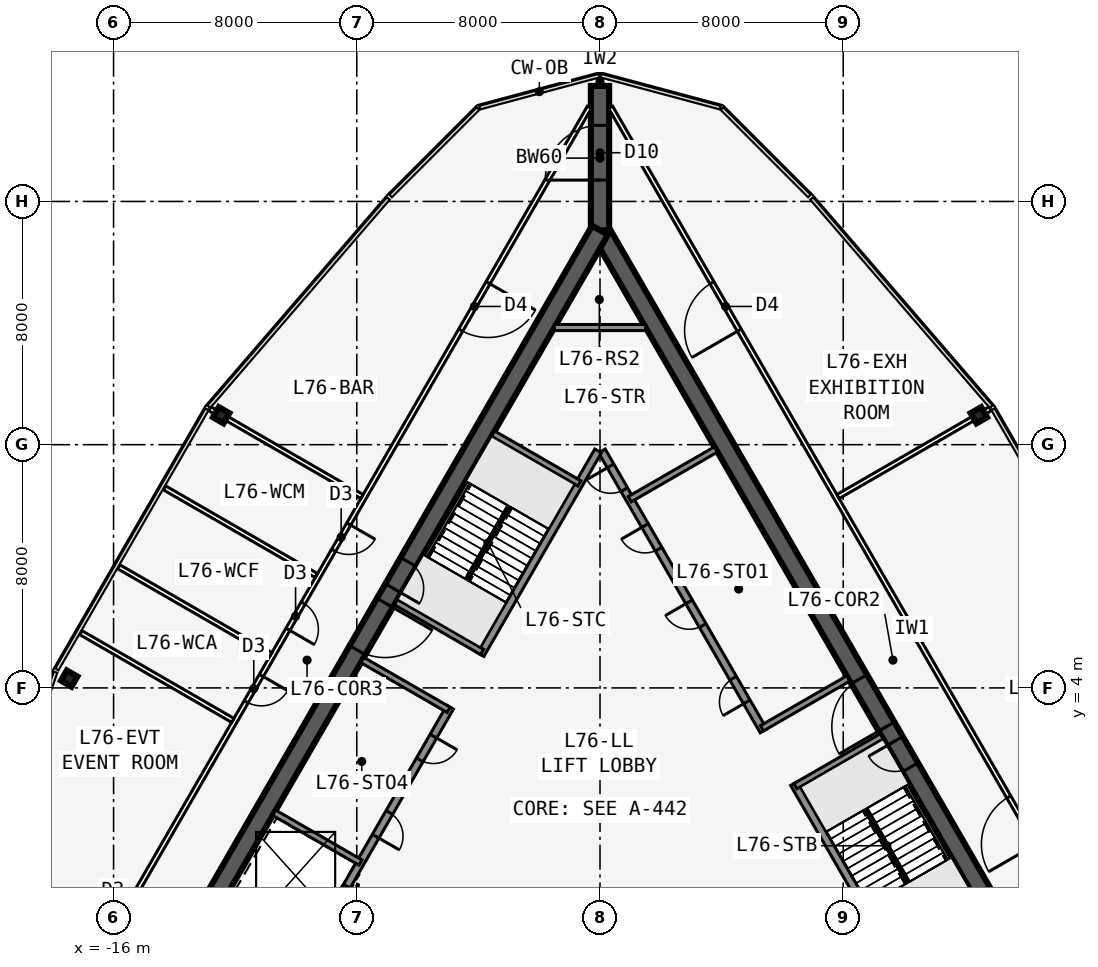
"""IFC4 building model, lengths in metres.
Left out: names, types, materials, properties, quantities, classifications, styles, units other than length and angle.
Written with IfcOpenShell. Run it as: python <this file> out.ifc"""

import sys

from ifc_helpers import new_model, si_unit, direction, frame, frame_2d, origin, origin_2d, place, context, subcontext, project, spatial, rectangle, i_section, extrude, element, fill, save


model = new_model("IFC4")
c1 = context("Model", 3, precision=1e-05, world=origin(), true_north=direction((0.0, 1.0)))
c2 = subcontext(c1, "Body", "Model", "MODEL_VIEW")
j1 = project(units=[si_unit("LENGTHUNIT", "METRE"), si_unit("PLANEANGLEUNIT", "RADIAN")], contexts=[c1])
p1 = place(None, origin())
s1 = spatial("IfcSite", under=j1, at=p1, CompositionType="ELEMENT")
p2 = place(p1, origin())
s2 = spatial("IfcBuilding", under=s1, at=p2, CompositionType="ELEMENT")
p3 = place(p2, frame((0.0, 0.0, 292.8)))
s3 = spatial("IfcBuildingStorey", under=s2, at=p3, CompositionType="ELEMENT", Elevation=292.8)
p4 = place(p3, frame((16.5, -9.526, 0.0), z_axis=(0.0, 0.0, 1.0), x_axis=(-0.499999749417, 0.866025548458, 0.0)))
e1 = element("IfcWall", 1, at=p4, inside=s3, PredefinedType="SHEAR", context=c2, shape_type="SweptSolid", body=[
    extrude(rectangle(XDim=33.0, YDim=0.6, at=frame_2d((16.5, 0.0))), origin(), (0.0, 0.0, 1.0), 5.0),
])
p5 = place(p4, frame((14.15, 0.0, 0.0)))
e2 = element("IfcOpeningElement", 2, at=p5, cuts=e1, PredefinedType="OPENING", context=c2, shape_type="SweptSolid", body=[
    extrude(rectangle(XDim=1.8, YDim=2.13, at=frame_2d((0.9, 1.065))), frame((0.0, 0.31, 0.0), z_axis=(0.0, -1.0, 0.0), x_axis=(1.0, 0.0, 0.0)), (0.0, 0.0, 1.0), 0.62),
])
p6 = place(p4, frame((12.6, 0.0, 0.0)))
e3 = element("IfcOpeningElement", 3, at=p6, cuts=e1, PredefinedType="OPENING", context=c2, shape_type="SweptSolid", body=[
    extrude(rectangle(XDim=1.0, YDim=2.13, at=frame_2d((0.5, 1.065))), frame((0.0, 0.31, 0.0), z_axis=(0.0, -1.0, 0.0), x_axis=(1.0, 0.0, 0.0)), (0.0, 0.0, 1.0), 0.62),
])
p7 = place(p3, frame((10.245, -5.843, 0.0), z_axis=(0.0, 0.0, 1.0), x_axis=(-0.499993009313, 0.866029439822, 0.0)))
e4 = element("IfcWall", 4, at=p7, inside=s3, PredefinedType="SOLIDWALL", context=c2, shape_type="SweptSolid", body=[
    extrude(rectangle(XDim=7.733, YDim=0.25, at=frame_2d((3.866, 0.0))), origin(), (0.0, 0.0, 1.0), 4.75),
])
p8 = place(p3, frame((5.379, 2.586, 0.0), z_axis=(0.0, 0.0, 1.0), x_axis=(-0.500001375892, 0.866024609411, 0.0)))
e5 = element("IfcWall", 5, at=p8, inside=s3, PredefinedType="SOLIDWALL", context=c2, shape_type="SweptSolid", body=[
    extrude(rectangle(XDim=10.633, YDim=0.25, at=frame_2d((5.316, 0.0))), origin(), (0.0, 0.0, 1.0), 4.75),
])
p9 = place(p8, frame((9.164, 0.0, 0.0)))
e6 = element("IfcOpeningElement", 6, at=p9, cuts=e5, PredefinedType="OPENING", context=c2, shape_type="SweptSolid", body=[
    extrude(rectangle(XDim=0.9, YDim=2.13, at=frame_2d((0.45, 1.065))), frame((0.0, 0.135, 0.0), z_axis=(0.0, -1.0, 0.0), x_axis=(1.0, 0.0, 0.0)), (0.0, 0.0, 1.0), 0.27),
])
p10 = place(p8, frame((1.1, 0.0, 0.0)))
e7 = element("IfcOpeningElement", 7, at=p10, cuts=e5, PredefinedType="OPENING", context=c2, shape_type="SweptSolid", body=[
    extrude(rectangle(XDim=0.9, YDim=2.13, at=frame_2d((0.45, 1.065))), frame((0.0, 0.135, 0.0), z_axis=(0.0, -1.0, 0.0), x_axis=(1.0, 0.0, 0.0)), (0.0, 0.0, 1.0), 0.27),
])
p11 = place(p8, frame((4.0, 0.0, 0.0)))
e8 = element("IfcOpeningElement", 8, at=p11, cuts=e5, PredefinedType="OPENING", context=c2, shape_type="SweptSolid", body=[
    extrude(rectangle(XDim=0.9, YDim=2.13, at=frame_2d((0.45, 1.065))), frame((0.0, 0.135, 0.0), z_axis=(0.0, -1.0, 0.0), x_axis=(1.0, 0.0, 0.0)), (0.0, 0.0, 1.0), 0.27),
])
p12 = place(p8, frame((6.9, 0.0, 0.0)))
e9 = element("IfcOpeningElement", 9, at=p12, cuts=e5, PredefinedType="OPENING", context=c2, shape_type="SweptSolid", body=[
    extrude(rectangle(XDim=0.9, YDim=2.13, at=frame_2d((0.45, 1.065))), frame((0.0, 0.135, 0.0), z_axis=(0.0, -1.0, 0.0), x_axis=(1.0, 0.0, 0.0)), (0.0, 0.0, 1.0), 0.27),
])
for number, where, z_axis, x_axis in (
    (10, (6.429, 0.767, 0.0), (0.0, 0.0, 1.0), (0.866, 0.5, 0.0)),
    (11, (5.329, 2.673, 0.0), (0.0, 0.0, 1.0), (0.866, 0.5, 0.0)),
    (12, (0.979, 10.207, 0.0), (0.0, 0.0, 1.0), (0.866, 0.5, 0.0)),
):
    element("IfcWall", number, at=place(p3, frame(where, z_axis=z_axis, x_axis=x_axis)), inside=s3, PredefinedType="SOLIDWALL", context=c2, shape_type="SweptSolid", body=[
        extrude(rectangle(XDim=3.275, YDim=0.2, at=frame_2d((1.637, 0.0))), origin(), (0.0, 0.0, 1.0), 4.75),
    ])
p13 = place(p3, frame((0.0, 19.052, 0.0), z_axis=(0.0, 0.0, 1.0), x_axis=(-0.499999749417, -0.866025548458, 0.0)))
e13 = element("IfcWall", 13, at=p13, inside=s3, PredefinedType="SHEAR", context=c2, shape_type="SweptSolid", body=[
    extrude(rectangle(XDim=33.0, YDim=0.6, at=frame_2d((16.5, 0.0))), origin(), (0.0, 0.0, 1.0), 5.0),
])
p14 = place(p13, frame((14.15, 0.0, 0.0)))
e14 = element("IfcOpeningElement", 14, at=p14, cuts=e13, PredefinedType="OPENING", context=c2, shape_type="SweptSolid", body=[
    extrude(rectangle(XDim=1.8, YDim=2.13, at=frame_2d((0.9, 1.065))), frame((0.0, 0.31, 0.0), z_axis=(0.0, -1.0, 0.0), x_axis=(1.0, 0.0, 0.0)), (0.0, 0.0, 1.0), 0.62),
])
p15 = place(p13, frame((12.6, 0.0, 0.0)))
e15 = element("IfcOpeningElement", 15, at=p15, cuts=e13, PredefinedType="OPENING", context=c2, shape_type="SweptSolid", body=[
    extrude(rectangle(XDim=1.0, YDim=2.13, at=frame_2d((0.5, 1.065))), frame((0.0, 0.31, 0.0), z_axis=(0.0, -1.0, 0.0), x_axis=(1.0, 0.0, 0.0)), (0.0, 0.0, 1.0), 0.62),
])
p16 = place(p3, frame((-0.062, 11.794, 0.0), z_axis=(0.0, 0.0, 1.0), x_axis=(-0.500006680225, -0.86602154692, 0.0)))
e16 = element("IfcWall", 16, at=p16, inside=s3, PredefinedType="SOLIDWALL", context=c2, shape_type="SweptSolid", body=[
    extrude(rectangle(XDim=7.733, YDim=0.25, at=frame_2d((3.866, 0.0))), origin(), (0.0, 0.0, 1.0), 4.75),
])
p17 = place(p3, frame((-4.929, 3.365, 0.0), z_axis=(0.0, 0.0, 1.0), x_axis=(-0.499991433582, -0.866030349552, 0.0)))
e17 = element("IfcWall", 17, at=p17, inside=s3, PredefinedType="SOLIDWALL", context=c2, shape_type="SweptSolid", body=[
    extrude(rectangle(XDim=10.633, YDim=0.25, at=frame_2d((5.316, 0.0))), origin(), (0.0, 0.0, 1.0), 4.75),
])
p18 = place(p17, frame((9.164, 0.0, 0.0)))
e18 = element("IfcOpeningElement", 18, at=p18, cuts=e17, PredefinedType="OPENING", context=c2, shape_type="SweptSolid", body=[
    extrude(rectangle(XDim=0.9, YDim=2.13, at=frame_2d((0.45, 1.065))), frame((0.0, 0.135, 0.0), z_axis=(0.0, -1.0, 0.0), x_axis=(1.0, 0.0, 0.0)), (0.0, 0.0, 1.0), 0.27),
])
p19 = place(p17, frame((1.1, 0.0, 0.0)))
e19 = element("IfcOpeningElement", 19, at=p19, cuts=e17, PredefinedType="OPENING", context=c2, shape_type="SweptSolid", body=[
    extrude(rectangle(XDim=0.9, YDim=2.13, at=frame_2d((0.45, 1.065))), frame((0.0, 0.135, 0.0), z_axis=(0.0, -1.0, 0.0), x_axis=(1.0, 0.0, 0.0)), (0.0, 0.0, 1.0), 0.27),
])
p20 = place(p17, frame((4.0, 0.0, 0.0)))
e20 = element("IfcOpeningElement", 20, at=p20, cuts=e17, PredefinedType="OPENING", context=c2, shape_type="SweptSolid", body=[
    extrude(rectangle(XDim=0.9, YDim=2.13, at=frame_2d((0.45, 1.065))), frame((0.0, 0.135, 0.0), z_axis=(0.0, -1.0, 0.0), x_axis=(1.0, 0.0, 0.0)), (0.0, 0.0, 1.0), 0.27),
])
p21 = place(p17, frame((6.8, 0.0, 0.0)))
e21 = element("IfcOpeningElement", 21, at=p21, cuts=e17, PredefinedType="OPENING", context=c2, shape_type="SweptSolid", body=[
    extrude(rectangle(XDim=1.1, YDim=2.13, at=frame_2d((0.55, 1.065))), frame((0.0, 0.135, 0.0), z_axis=(0.0, -1.0, 0.0), x_axis=(1.0, 0.0, 0.0)), (0.0, 0.0, 1.0), 0.27),
])
for number, where, z_axis, x_axis in (
    (22, (-0.679, 10.727, 0.0), (0.0, 0.0, 1.0), (-0.866, 0.5, 0.0)),
    (23, (-3.879, 5.184, 0.0), (0.0, 0.0, 1.0), (-0.866, 0.5, 0.0)),
    (24, (-4.979, 3.279, 0.0), (0.0, 0.0, 1.0), (-0.866, 0.5, 0.0)),
    (25, (-7.879, -1.744, 0.0), (0.0, 0.0, 1.0), (-0.866, 0.5, 0.0)),
    (26, (-9.329, -4.256, 0.0), (0.0, 0.0, 1.0), (-0.866, 0.5, 0.0)),
):
    element("IfcWall", number, at=place(p3, frame(where, z_axis=z_axis, x_axis=x_axis)), inside=s3, PredefinedType="SOLIDWALL", context=c2, shape_type="SweptSolid", body=[
        extrude(rectangle(XDim=3.275, YDim=0.2, at=frame_2d((1.637, 0.0))), origin(), (0.0, 0.0, 1.0), 4.75),
    ])
p22 = place(p3, frame((0.0, 19.052, 0.0), z_axis=(0.0, 0.0, 1.0), x_axis=(0.0, 1.0, 0.0)))
e27 = element("IfcWall", 27, at=p22, inside=s3, PredefinedType="SHEAR", context=c2, shape_type="SweptSolid", body=[
    extrude(rectangle(XDim=4.746, YDim=0.6, at=frame_2d((2.373, 0.0))), origin(), (0.0, 0.0, 1.0), 5.0),
])
p23 = place(p22, frame((1.65, 0.0, 0.0)))
e28 = element("IfcOpeningElement", 28, at=p23, cuts=e27, PredefinedType="OPENING", context=c2, shape_type="SweptSolid", body=[
    extrude(rectangle(XDim=1.8, YDim=2.13, at=frame_2d((0.9, 1.065))), frame((0.0, 0.31, 0.0), z_axis=(0.0, -1.0, 0.0), x_axis=(1.0, 0.0, 0.0)), (0.0, 0.0, 1.0), 0.62),
])
for number, where, z_axis, x_axis in (
    (29, (12.461, 12.968, 0.0), (0.0, 0.0, 1.0), (0.866, 0.5, 0.0)),
    (30, (-12.461, 12.968, 0.0), (0.0, 0.0, 1.0), (-0.866, 0.5, 0.0)),
    (31, (-17.461, 4.308, 0.0), (0.0, 0.0, 1.0), (-0.866, 0.5, 0.0)),
):
    element("IfcColumn", number, at=place(p3, frame(where, z_axis=z_axis, x_axis=x_axis)), inside=s3, PredefinedType="COLUMN", context=c2, shape_type="SweptSolid", body=[
        extrude(i_section(OverallWidth=0.399, OverallDepth=0.386, WebThickness=0.021, FlangeThickness=0.033, at=origin_2d()), origin(), (0.0, 0.0, 1.0), 5.0),
    ])
p24 = place(p3, frame((20.177, -11.245, 0.0), z_axis=(0.0, 0.0, 1.0), x_axis=(-0.499998875317, 0.866026053119, 0.0)))
e32 = element("IfcWall", 32, at=p24, inside=s3, PredefinedType="PARTITIONING", context=c2, shape_type="SweptSolid", body=[
    extrude(rectangle(XDim=39.654, YDim=0.15, at=frame_2d((19.827, 0.0))), origin(), (0.0, 0.0, 1.0), 4.75),
])
p25 = place(p24, frame((11.664, 0.0, 0.0)))
e33 = element("IfcOpeningElement", 33, at=p25, cuts=e32, PredefinedType="OPENING", context=c2, shape_type="SweptSolid", body=[
    extrude(rectangle(XDim=1.8, YDim=2.13, at=frame_2d((0.9, 1.065))), frame((0.0, 0.085, 0.0), z_axis=(0.0, -1.0, 0.0), x_axis=(1.0, 0.0, 0.0)), (0.0, 0.0, 1.0), 0.17),
])
p26 = place(p24, frame((31.19, 0.0, 0.0)))
e34 = element("IfcOpeningElement", 34, at=p26, cuts=e32, PredefinedType="OPENING", context=c2, shape_type="SweptSolid", body=[
    extrude(rectangle(XDim=1.8, YDim=2.13, at=frame_2d((0.9, 1.065))), frame((0.0, 0.085, 0.0), z_axis=(0.0, -1.0, 0.0), x_axis=(1.0, 0.0, 0.0)), (0.0, 0.0, 1.0), 0.17),
])
p27 = place(p3, frame((7.829, 10.293, 0.0), z_axis=(0.0, 0.0, 1.0), x_axis=(0.866003332883, 0.500038225974, 0.0)))
e35 = element("IfcWall", 35, at=p27, inside=s3, PredefinedType="PARTITIONING", context=c2, shape_type="SweptSolid", body=[
    extrude(rectangle(XDim=5.778, YDim=0.15, at=frame_2d((2.889, 0.0))), origin(), (0.0, 0.0, 1.0), 3.894),
])
p28 = place(p3, frame((-0.35, 23.096, 0.0), z_axis=(0.0, 0.0, 1.0), x_axis=(-0.499998875317, -0.866026053119, 0.0)))
e36 = element("IfcWall", 36, at=p28, inside=s3, PredefinedType="PARTITIONING", context=c2, shape_type="SweptSolid", body=[
    extrude(rectangle(XDim=39.654, YDim=0.15, at=frame_2d((19.827, 0.0))), origin(), (0.0, 0.0, 1.0), 4.75),
])
p29 = place(p28, frame((6.664, 0.0, 0.0)))
e37 = element("IfcOpeningElement", 37, at=p29, cuts=e36, PredefinedType="OPENING", context=c2, shape_type="SweptSolid", body=[
    extrude(rectangle(XDim=1.8, YDim=2.13, at=frame_2d((0.9, 1.065))), frame((0.0, 0.085, 0.0), z_axis=(0.0, -1.0, 0.0), x_axis=(1.0, 0.0, 0.0)), (0.0, 0.0, 1.0), 0.17),
])
p30 = place(p28, frame((15.827, 0.0, 0.0)))
e38 = element("IfcOpeningElement", 38, at=p30, cuts=e36, PredefinedType="OPENING", context=c2, shape_type="SweptSolid", body=[
    extrude(rectangle(XDim=1.0, YDim=2.13, at=frame_2d((0.5, 1.065))), frame((0.0, 0.085, 0.0), z_axis=(0.0, -1.0, 0.0), x_axis=(1.0, 0.0, 0.0)), (0.0, 0.0, 1.0), 0.17),
])
p31 = place(p28, frame((18.827, 0.0, 0.0)))
e39 = element("IfcOpeningElement", 39, at=p31, cuts=e36, PredefinedType="OPENING", context=c2, shape_type="SweptSolid", body=[
    extrude(rectangle(XDim=1.0, YDim=2.13, at=frame_2d((0.5, 1.065))), frame((0.0, 0.085, 0.0), z_axis=(0.0, -1.0, 0.0), x_axis=(1.0, 0.0, 0.0)), (0.0, 0.0, 1.0), 0.17),
])
p32 = place(p28, frame((21.577, 0.0, 0.0)))
e40 = element("IfcOpeningElement", 40, at=p32, cuts=e36, PredefinedType="OPENING", context=c2, shape_type="SweptSolid", body=[
    extrude(rectangle(XDim=1.0, YDim=2.13, at=frame_2d((0.5, 1.065))), frame((0.0, 0.085, 0.0), z_axis=(0.0, -1.0, 0.0), x_axis=(1.0, 0.0, 0.0)), (0.0, 0.0, 1.0), 0.17),
])
p33 = place(p28, frame((30.841, 0.0, 0.0)))
e41 = element("IfcOpeningElement", 41, at=p33, cuts=e36, PredefinedType="OPENING", context=c2, shape_type="SweptSolid", body=[
    extrude(rectangle(XDim=1.0, YDim=2.13, at=frame_2d((0.5, 1.065))), frame((0.0, 0.085, 0.0), z_axis=(0.0, -1.0, 0.0), x_axis=(1.0, 0.0, 0.0)), (0.0, 0.0, 1.0), 0.17),
])
p34 = place(p3, frame((-7.829, 10.293, 0.0), z_axis=(0.0, 0.0, 1.0), x_axis=(-0.866003332883, 0.500038225974, 0.0)))
e42 = element("IfcWall", 42, at=p34, inside=s3, PredefinedType="PARTITIONING", context=c2, shape_type="SweptSolid", body=[
    extrude(rectangle(XDim=5.778, YDim=0.15, at=frame_2d((2.889, 0.0))), origin(), (0.0, 0.0, 1.0), 3.894),
])
for number, where, z_axis, x_axis in (
    (43, (-9.329, 7.695, 0.0), (0.0, 0.0, 1.0), (-0.866, 0.5, 0.0)),
    (44, (-10.829, 5.097, 0.0), (0.0, 0.0, 1.0), (-0.866, 0.5, 0.0)),
    (45, (-12.079, 2.932, 0.0), (0.0, 0.0, 1.0), (-0.866, 0.5, 0.0)),
):
    element("IfcWall", number, at=place(p3, frame(where, z_axis=z_axis, x_axis=x_axis)), inside=s3, PredefinedType="PARTITIONING", context=c2, shape_type="SweptSolid", body=[
        extrude(rectangle(XDim=5.769, YDim=0.15, at=frame_2d((2.885, 0.0))), origin(), (0.0, 0.0, 1.0), 4.75),
    ])
p35 = place(p3, frame((0.0, 23.799, 0.0), z_axis=(0.0, 0.0, 1.0), x_axis=(0.0, 1.0, 0.0)))
e46 = element("IfcWall", 46, at=p35, inside=s3, PredefinedType="PARTITIONING", context=c2, shape_type="SweptSolid", body=[
    extrude(rectangle(XDim=0.27, YDim=0.15, at=frame_2d((0.135, 0.0))), origin(), (0.0, 0.0, 1.0), 4.75),
])
p36 = place(p3, frame((-1.501, 15.853, 0.0), z_axis=(0.0, 0.0, 1.0), x_axis=(1.0, 0.0, 0.0)))
e47 = element("IfcWall", 47, at=p36, inside=s3, PredefinedType="SOLIDWALL", context=c2, shape_type="SweptSolid", body=[
    extrude(rectangle(XDim=3.002, YDim=0.2, at=frame_2d((1.501, 0.0))), origin(), (0.0, 0.0, 1.0), 4.75),
])
for number, where, z_axis, x_axis in (
    (48, (10.135, -2.401, 0.0), (0.0, 0.0, 1.0), (-0.5, 0.866, 0.0)),
    (49, (-2.988, 9.978, 0.0), (0.0, 0.0, 1.0), (-0.5, -0.866, 0.0)),
):
    element("IfcWall", number, at=place(p3, frame(where, z_axis=z_axis, x_axis=x_axis)), inside=s3, PredefinedType="SOLIDWALL", context=c2, shape_type="SweptSolid", body=[
        extrude(rectangle(XDim=2.794, YDim=0.1, at=frame_2d((1.397, 0.0))), origin(), (0.0, 0.0, 1.0), 5.0),
    ])
p37 = place(p25, origin())
e50 = element("IfcDoor", 50, at=p37, inside=s3, OperationType="DOUBLE_DOOR_SINGLE_SWING", PredefinedType="DOOR", context=c2, shape_type="SweptSolid", body=[
    extrude(rectangle(XDim=1.8, YDim=2.13, at=frame_2d((0.9, 1.065))), frame((0.0, 0.025, 0.0), z_axis=(0.0, -1.0, 0.0), x_axis=(1.0, 0.0, 0.0)), (0.0, 0.0, 1.0), 0.05),
])
fill(e33, e50)
p38 = place(p26, origin())
e51 = element("IfcDoor", 51, at=p38, inside=s3, OperationType="DOUBLE_DOOR_SINGLE_SWING", PredefinedType="DOOR", context=c2, shape_type="SweptSolid", body=[
    extrude(rectangle(XDim=1.8, YDim=2.13, at=frame_2d((0.9, 1.065))), frame((0.0, 0.025, 0.0), z_axis=(0.0, -1.0, 0.0), x_axis=(1.0, 0.0, 0.0)), (0.0, 0.0, 1.0), 0.05),
])
fill(e34, e51)
p39 = place(p29, origin())
e52 = element("IfcDoor", 52, at=p39, inside=s3, OperationType="DOUBLE_DOOR_SINGLE_SWING", PredefinedType="DOOR", context=c2, shape_type="SweptSolid", body=[
    extrude(rectangle(XDim=1.8, YDim=2.13, at=frame_2d((0.9, 1.065))), frame((0.0, 0.025, 0.0), z_axis=(0.0, -1.0, 0.0), x_axis=(1.0, 0.0, 0.0)), (0.0, 0.0, 1.0), 0.05),
])
fill(e37, e52)
p40 = place(p30, origin())
e53 = element("IfcDoor", 53, at=p40, inside=s3, OperationType="SINGLE_SWING_LEFT", PredefinedType="DOOR", context=c2, shape_type="SweptSolid", body=[
    extrude(rectangle(XDim=1.0, YDim=2.13, at=frame_2d((0.5, 1.065))), frame((0.0, 0.025, 0.0), z_axis=(0.0, -1.0, 0.0), x_axis=(1.0, 0.0, 0.0)), (0.0, 0.0, 1.0), 0.05),
])
fill(e38, e53)
p41 = place(p31, origin())
e54 = element("IfcDoor", 54, at=p41, inside=s3, OperationType="SINGLE_SWING_RIGHT", PredefinedType="DOOR", context=c2, shape_type="SweptSolid", body=[
    extrude(rectangle(XDim=1.0, YDim=2.13, at=frame_2d((0.5, 1.065))), frame((0.0, 0.025, 0.0), z_axis=(0.0, -1.0, 0.0), x_axis=(1.0, 0.0, 0.0)), (0.0, 0.0, 1.0), 0.05),
])
fill(e39, e54)
p42 = place(p32, origin())
e55 = element("IfcDoor", 55, at=p42, inside=s3, OperationType="SINGLE_SWING_LEFT", PredefinedType="DOOR", context=c2, shape_type="SweptSolid", body=[
    extrude(rectangle(XDim=1.0, YDim=2.13, at=frame_2d((0.5, 1.065))), frame((0.0, 0.025, 0.0), z_axis=(0.0, -1.0, 0.0), x_axis=(1.0, 0.0, 0.0)), (0.0, 0.0, 1.0), 0.05),
])
fill(e40, e55)
p43 = place(p5, origin())
e56 = element("IfcDoor", 56, at=p43, inside=s3, OperationType="DOUBLE_DOOR_SINGLE_SWING", PredefinedType="DOOR", context=c2, shape_type="SweptSolid", body=[
    extrude(rectangle(XDim=1.8, YDim=2.13, at=frame_2d((0.9, 1.065))), frame((0.0, 0.025, 0.0), z_axis=(0.0, -1.0, 0.0), x_axis=(1.0, 0.0, 0.0)), (0.0, 0.0, 1.0), 0.05),
])
fill(e2, e56)
p44 = place(p6, origin())
e57 = element("IfcDoor", 57, at=p44, inside=s3, OperationType="SINGLE_SWING_RIGHT", PredefinedType="DOOR", context=c2, shape_type="SweptSolid", body=[
    extrude(rectangle(XDim=1.0, YDim=2.13, at=frame_2d((0.5, 1.065))), frame((0.0, 0.025, 0.0), z_axis=(0.0, -1.0, 0.0), x_axis=(1.0, 0.0, 0.0)), (0.0, 0.0, 1.0), 0.05),
])
fill(e3, e57)
p45 = place(p14, origin())
e58 = element("IfcDoor", 58, at=p45, inside=s3, OperationType="DOUBLE_DOOR_SINGLE_SWING", PredefinedType="DOOR", context=c2, shape_type="SweptSolid", body=[
    extrude(rectangle(XDim=1.8, YDim=2.13, at=frame_2d((0.9, 1.065))), frame((0.0, 0.025, 0.0), z_axis=(0.0, -1.0, 0.0), x_axis=(1.0, 0.0, 0.0)), (0.0, 0.0, 1.0), 0.05),
])
fill(e14, e58)
p46 = place(p15, origin())
e59 = element("IfcDoor", 59, at=p46, inside=s3, OperationType="SINGLE_SWING_RIGHT", PredefinedType="DOOR", context=c2, shape_type="SweptSolid", body=[
    extrude(rectangle(XDim=1.0, YDim=2.13, at=frame_2d((0.5, 1.065))), frame((0.0, 0.025, 0.0), z_axis=(0.0, -1.0, 0.0), x_axis=(1.0, 0.0, 0.0)), (0.0, 0.0, 1.0), 0.05),
])
fill(e15, e59)
p47 = place(p23, origin())
e60 = element("IfcDoor", 60, at=p47, inside=s3, OperationType="DOUBLE_DOOR_DOUBLE_SWING", PredefinedType="DOOR", context=c2, shape_type="SweptSolid", body=[
    extrude(rectangle(XDim=1.8, YDim=2.13, at=frame_2d((0.9, 1.065))), frame((0.0, 0.025, 0.0), z_axis=(0.0, -1.0, 0.0), x_axis=(1.0, 0.0, 0.0)), (0.0, 0.0, 1.0), 0.05),
])
fill(e28, e60)
p48 = place(p9, origin())
e61 = element("IfcDoor", 61, at=p48, inside=s3, OperationType="SINGLE_SWING_RIGHT", PredefinedType="DOOR", context=c2, shape_type="SweptSolid", body=[
    extrude(rectangle(XDim=0.9, YDim=2.13, at=frame_2d((0.45, 1.065))), frame((0.0, 0.025, 0.0), z_axis=(0.0, -1.0, 0.0), x_axis=(1.0, 0.0, 0.0)), (0.0, 0.0, 1.0), 0.05),
])
fill(e6, e61)
p49 = place(p10, origin())
e62 = element("IfcDoor", 62, at=p49, inside=s3, OperationType="SINGLE_SWING_LEFT", PredefinedType="DOOR", context=c2, shape_type="SweptSolid", body=[
    extrude(rectangle(XDim=0.9, YDim=2.13, at=frame_2d((0.45, 1.065))), frame((0.0, 0.025, 0.0), z_axis=(0.0, -1.0, 0.0), x_axis=(1.0, 0.0, 0.0)), (0.0, 0.0, 1.0), 0.05),
])
fill(e7, e62)
p50 = place(p11, origin())
e63 = element("IfcDoor", 63, at=p50, inside=s3, OperationType="SINGLE_SWING_RIGHT", PredefinedType="DOOR", context=c2, shape_type="SweptSolid", body=[
    extrude(rectangle(XDim=0.9, YDim=2.13, at=frame_2d((0.45, 1.065))), frame((0.0, 0.025, 0.0), z_axis=(0.0, -1.0, 0.0), x_axis=(1.0, 0.0, 0.0)), (0.0, 0.0, 1.0), 0.05),
])
fill(e8, e63)
p51 = place(p12, origin())
e64 = element("IfcDoor", 64, at=p51, inside=s3, OperationType="SINGLE_SWING_RIGHT", PredefinedType="DOOR", context=c2, shape_type="SweptSolid", body=[
    extrude(rectangle(XDim=0.9, YDim=2.13, at=frame_2d((0.45, 1.065))), frame((0.0, 0.025, 0.0), z_axis=(0.0, -1.0, 0.0), x_axis=(1.0, 0.0, 0.0)), (0.0, 0.0, 1.0), 0.05),
])
fill(e9, e64)
p52 = place(p19, origin())
e65 = element("IfcDoor", 65, at=p52, inside=s3, OperationType="SINGLE_SWING_LEFT", PredefinedType="DOOR", context=c2, shape_type="SweptSolid", body=[
    extrude(rectangle(XDim=0.9, YDim=2.13, at=frame_2d((0.45, 1.065))), frame((0.0, 0.025, 0.0), z_axis=(0.0, -1.0, 0.0), x_axis=(1.0, 0.0, 0.0)), (0.0, 0.0, 1.0), 0.05),
])
fill(e19, e65)
p53 = place(p20, origin())
e66 = element("IfcDoor", 66, at=p53, inside=s3, OperationType="SINGLE_SWING_RIGHT", PredefinedType="DOOR", context=c2, shape_type="SweptSolid", body=[
    extrude(rectangle(XDim=0.9, YDim=2.13, at=frame_2d((0.45, 1.065))), frame((0.0, 0.025, 0.0), z_axis=(0.0, -1.0, 0.0), x_axis=(1.0, 0.0, 0.0)), (0.0, 0.0, 1.0), 0.05),
])
fill(e20, e66)
p54 = place(p21, origin())
e67 = element("IfcDoor", 67, at=p54, inside=s3, OperationType="DOUBLE_DOOR_SLIDING", PredefinedType="USERDEFINED", context=c2, shape_type="SweptSolid", body=[
    extrude(rectangle(XDim=1.1, YDim=2.13, at=frame_2d((0.55, 1.065))), frame((0.0, 0.025, 0.0), z_axis=(0.0, -1.0, 0.0), x_axis=(1.0, 0.0, 0.0)), (0.0, 0.0, 1.0), 0.05),
])
fill(e21, e67)
save(model, sys.argv[1])
